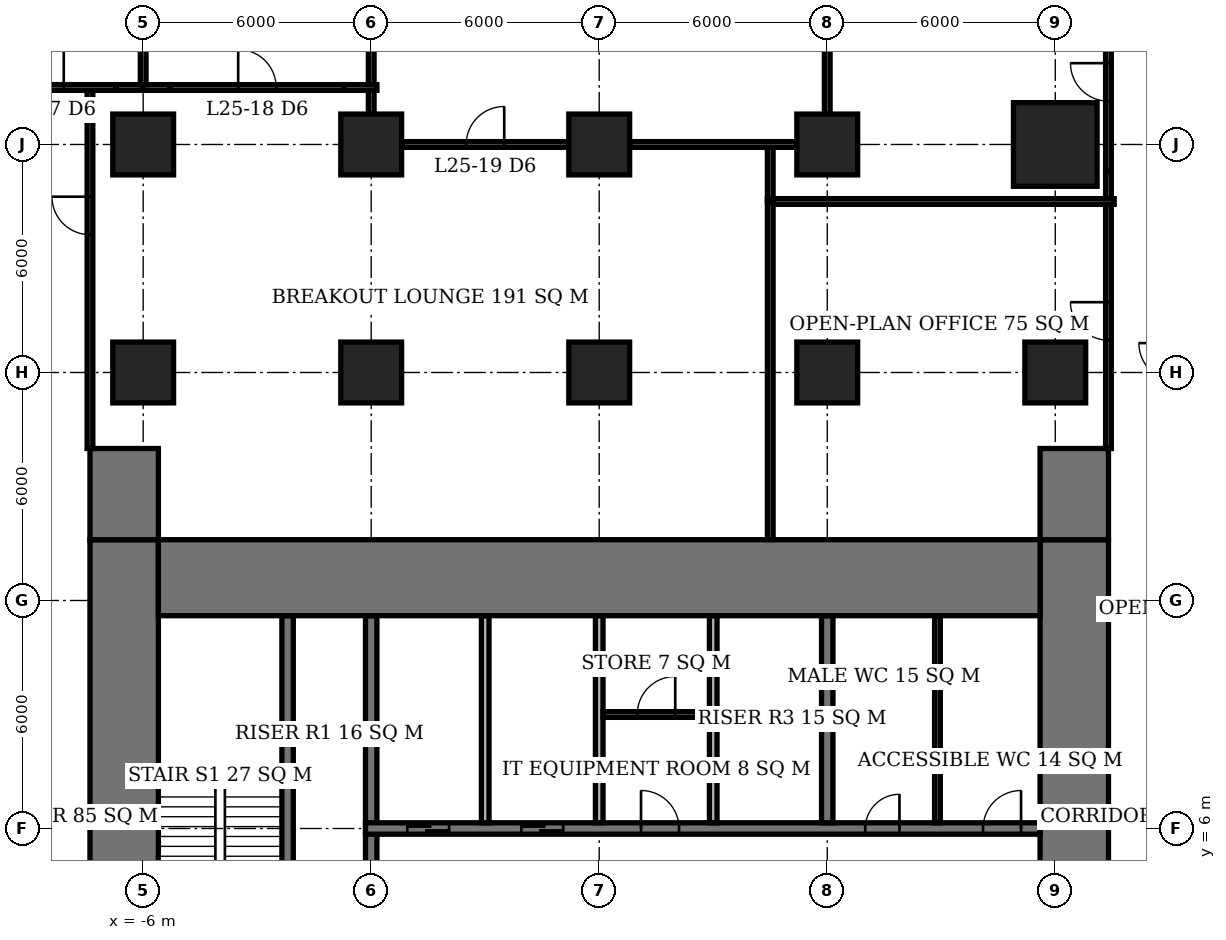
"""IFC4 building model, lengths in metres.
Left out: names, types, materials, properties, quantities, classifications, styles, units other than length and angle.
Written with IfcOpenShell. Run it as: python <this file> out.ifc"""

import sys

from ifc_helpers import new_model, si_unit, direction, frame, frame_2d, origin, origin_2d, place, context, subcontext, project, spatial, rectangle, extrude, element, fill, save


model = new_model("IFC4")
c1 = context("Model", 3, precision=1e-05, world=origin(), true_north=direction((0.0, 1.0)))
c2 = subcontext(c1, "Body", "Model", "MODEL_VIEW")
j1 = project(units=[si_unit("LENGTHUNIT", "METRE"), si_unit("PLANEANGLEUNIT", "RADIAN")], contexts=[c1])
p1 = place(None, origin())
s1 = spatial("IfcSite", under=j1, at=p1, CompositionType="ELEMENT")
p2 = place(p1, origin())
s2 = spatial("IfcBuilding", under=s1, at=p2, CompositionType="ELEMENT")
p3 = place(p2, frame((0.0, 0.0, 105.5)))
s3 = spatial("IfcBuildingStorey", under=s2, at=p3, CompositionType="ELEMENT", Elevation=105.5)
for number, where, z_axis, x_axis in (
    (1, (-6.0, 18.0, 0.0), (0.0, 0.0, 1.0), (1.0, 0.0, 0.0)),
    (2, (-6.0, 24.0, 0.0), (0.0, 0.0, 1.0), (1.0, 0.0, 0.0)),
    (3, (0.0, 18.0, 0.0), (0.0, 0.0, 1.0), (1.0, 0.0, 0.0)),
    (4, (0.0, 24.0, 0.0), (0.0, 0.0, 1.0), (1.0, 0.0, 0.0)),
    (5, (6.0, 18.0, 0.0), (0.0, 0.0, 1.0), (1.0, 0.0, 0.0)),
    (6, (6.0, 24.0, 0.0), (0.0, 0.0, 1.0), (1.0, 0.0, 0.0)),
    (7, (12.0, 18.0, 0.0), (0.0, 0.0, 1.0), (1.0, 0.0, 0.0)),
    (8, (12.0, 24.0, 0.0), (0.0, 0.0, 1.0), (1.0, 0.0, 0.0)),
    (9, (18.0, 18.0, 0.0), (0.0, 0.0, 1.0), (1.0, 0.0, 0.0)),
):
    element("IfcColumn", number, at=place(p3, frame(where, z_axis=z_axis, x_axis=x_axis)), inside=s3, PredefinedType="COLUMN", context=c2, shape_type="SweptSolid", body=[
        extrude(rectangle(XDim=1.6, YDim=1.6, at=origin_2d()), origin(), (0.0, 0.0, 1.0), 3.9),
    ])
p4 = place(p3, frame((18.0, 24.0, 0.0), z_axis=(0.0, 0.0, 1.0), x_axis=(1.0, 0.0, 0.0)))
e10 = element("IfcColumn", 10, at=p4, inside=s3, PredefinedType="COLUMN", context=c2, shape_type="SweptSolid", body=[
    extrude(rectangle(XDim=2.2, YDim=2.2, at=origin_2d()), origin(), (0.0, 0.0, 1.0), 3.9),
])
p5 = place(p3, frame((-5.6, 12.6, 0.0), z_axis=(0.0, 0.0, 1.0), x_axis=(1.0, 0.0, 0.0)))
e11 = element("IfcWall", 11, at=p5, inside=s3, PredefinedType="SHEAR", context=c2, shape_type="SweptSolid", body=[
    extrude(rectangle(XDim=23.2, YDim=2.0, at=frame_2d((11.6, 0.0))), origin(), (0.0, 0.0, 1.0), 3.9),
])
p6 = place(p3, frame((-6.5, -7.6, 0.0), z_axis=(0.0, 0.0, 1.0), x_axis=(0.0, 1.0, 0.0)))
e12 = element("IfcWall", 12, at=p6, inside=s3, PredefinedType="SHEAR", context=c2, shape_type="SweptSolid", body=[
    extrude(rectangle(XDim=21.2, YDim=1.8, at=frame_2d((10.6, 0.0))), origin(), (0.0, 0.0, 1.0), 3.9),
])
p7 = place(p6, frame((7.8, 0.0, 0.0)))
e13 = element("IfcOpeningElement", 13, at=p7, cuts=e12, PredefinedType="OPENING", context=c2, shape_type="SweptSolid", body=[
    extrude(rectangle(XDim=1.8, YDim=2.4, at=frame_2d((0.9, 1.2))), frame((0.0, 0.91, 0.0), z_axis=(0.0, -1.0, 0.0), x_axis=(1.0, 0.0, 0.0)), (0.0, 0.0, 1.0), 1.82),
])
p8 = place(p3, frame((18.5, -7.6, 0.0), z_axis=(0.0, 0.0, 1.0), x_axis=(0.0, 1.0, 0.0)))
e14 = element("IfcWall", 14, at=p8, inside=s3, PredefinedType="SHEAR", context=c2, shape_type="SweptSolid", body=[
    extrude(rectangle(XDim=21.2, YDim=1.8, at=frame_2d((10.6, 0.0))), origin(), (0.0, 0.0, 1.0), 3.9),
])
p9 = place(p8, frame((9.2, 0.0, 0.0)))
e15 = element("IfcOpeningElement", 15, at=p9, cuts=e14, PredefinedType="OPENING", context=c2, shape_type="SweptSolid", body=[
    extrude(rectangle(XDim=1.8, YDim=2.4, at=frame_2d((0.9, 1.2))), frame((0.0, 0.91, 0.0), z_axis=(0.0, -1.0, 0.0), x_axis=(1.0, 0.0, 0.0)), (0.0, 0.0, 1.0), 1.82),
])
for number, where, z_axis, x_axis in (
    (16, (-6.5, 13.6, 0.0), (0.0, 0.0, 1.0), (0.0, 1.0, 0.0)),
    (17, (18.5, 13.6, 0.0), (0.0, 0.0, 1.0), (0.0, 1.0, 0.0)),
):
    element("IfcWall", number, at=place(p3, frame(where, z_axis=z_axis, x_axis=x_axis)), inside=s3, PredefinedType="SHEAR", context=c2, shape_type="SweptSolid", body=[
        extrude(rectangle(XDim=2.4, YDim=1.8, at=frame_2d((1.2, 0.0))), origin(), (0.0, 0.0, 1.0), 3.9),
    ])
p10 = place(p3, frame((-0.15, 6.0, 0.0), z_axis=(0.0, 0.0, 1.0), x_axis=(1.0, 0.0, 0.0)))
e18 = element("IfcWall", 18, at=p10, inside=s3, PredefinedType="SHEAR", context=c2, shape_type="SweptSolid", body=[
    extrude(rectangle(XDim=17.75, YDim=0.3, at=frame_2d((8.875, 0.0))), origin(), (0.0, 0.0, 1.0), 3.9),
])
p11 = place(p10, frame((13.15, 0.0, 0.0)))
e19 = element("IfcOpeningElement", 19, at=p11, cuts=e18, PredefinedType="OPENING", context=c2, shape_type="SweptSolid", body=[
    extrude(rectangle(XDim=0.9, YDim=2.1, at=frame_2d((0.45, 1.05))), frame((0.0, 0.16, 0.0), z_axis=(0.0, -1.0, 0.0), x_axis=(1.0, 0.0, 0.0)), (0.0, 0.0, 1.0), 0.32),
])
p12 = place(p10, frame((16.25, 0.0, 0.0)))
e20 = element("IfcOpeningElement", 20, at=p12, cuts=e18, PredefinedType="OPENING", context=c2, shape_type="SweptSolid", body=[
    extrude(rectangle(XDim=1.0, YDim=2.1, at=frame_2d((0.5, 1.05))), frame((0.0, 0.16, 0.0), z_axis=(0.0, -1.0, 0.0), x_axis=(1.0, 0.0, 0.0)), (0.0, 0.0, 1.0), 0.32),
])
p13 = place(p10, frame((7.25, 0.0, 0.0)))
e21 = element("IfcOpeningElement", 21, at=p13, cuts=e18, PredefinedType="OPENING", context=c2, shape_type="SweptSolid", body=[
    extrude(rectangle(XDim=1.0, YDim=2.1, at=frame_2d((0.5, 1.05))), frame((0.0, 0.16, 0.0), z_axis=(0.0, -1.0, 0.0), x_axis=(1.0, 0.0, 0.0)), (0.0, 0.0, 1.0), 0.32),
])
p14 = place(p10, frame((1.1, 0.0, 0.0)))
e22 = element("IfcOpeningElement", 22, at=p14, cuts=e18, PredefinedType="OPENING", context=c2, shape_type="SweptSolid", body=[
    extrude(rectangle(XDim=1.1, YDim=2.1, at=frame_2d((0.55, 1.05))), frame((0.0, 0.16, 0.0), z_axis=(0.0, -1.0, 0.0), x_axis=(1.0, 0.0, 0.0)), (0.0, 0.0, 1.0), 0.32),
])
p15 = place(p10, frame((4.1, 0.0, 0.0)))
e23 = element("IfcOpeningElement", 23, at=p15, cuts=e18, PredefinedType="OPENING", context=c2, shape_type="SweptSolid", body=[
    extrude(rectangle(XDim=1.1, YDim=2.1, at=frame_2d((0.55, 1.05))), frame((0.0, 0.16, 0.0), z_axis=(0.0, -1.0, 0.0), x_axis=(1.0, 0.0, 0.0)), (0.0, 0.0, 1.0), 0.32),
])
p16 = place(p3, frame((0.0, 3.15, 0.0), z_axis=(0.0, 0.0, 1.0), x_axis=(0.0, 1.0, 0.0)))
e24 = element("IfcWall", 24, at=p16, inside=s3, PredefinedType="SHEAR", context=c2, shape_type="SweptSolid", body=[
    extrude(rectangle(XDim=8.45, YDim=0.3, at=frame_2d((4.225, 0.0))), origin(), (0.0, 0.0, 1.0), 3.9),
])
p17 = place(p3, frame((12.0, 6.15, 0.0), z_axis=(0.0, 0.0, 1.0), x_axis=(0.0, 1.0, 0.0)))
e25 = element("IfcWall", 25, at=p17, inside=s3, PredefinedType="SHEAR", context=c2, shape_type="SweptSolid", body=[
    extrude(rectangle(XDim=5.45, YDim=0.3, at=frame_2d((2.725, 0.0))), origin(), (0.0, 0.0, 1.0), 3.9),
])
p18 = place(p3, frame((-2.2, 3.15, 0.0), z_axis=(0.0, 0.0, 1.0), x_axis=(0.0, 1.0, 0.0)))
e26 = element("IfcWall", 26, at=p18, inside=s3, PredefinedType="SHEAR", context=c2, shape_type="SweptSolid", body=[
    extrude(rectangle(XDim=8.45, YDim=0.3, at=frame_2d((4.225, 0.0))), origin(), (0.0, 0.0, 1.0), 3.9),
])
for number, where, z_axis, x_axis in (
    (27, (3.0, 6.15, 0.0), (0.0, 0.0, 1.0), (0.0, 1.0, 0.0)),
    (28, (6.0, 6.15, 0.0), (0.0, 0.0, 1.0), (0.0, 1.0, 0.0)),
    (29, (9.0, 6.15, 0.0), (0.0, 0.0, 1.0), (0.0, 1.0, 0.0)),
):
    element("IfcWall", number, at=place(p3, frame(where, z_axis=z_axis, x_axis=x_axis)), inside=s3, PredefinedType="SOLIDWALL", context=c2, shape_type="SweptSolid", body=[
        extrude(rectangle(XDim=5.45, YDim=0.2, at=frame_2d((2.725, 0.0))), origin(), (0.0, 0.0, 1.0), 3.9),
    ])
p19 = place(p3, frame((14.9, 6.15, 0.0), z_axis=(0.0, 0.0, 1.0), x_axis=(0.0, 1.0, 0.0)))
e30 = element("IfcWall", 30, at=p19, inside=s3, PredefinedType="PLUMBINGWALL", context=c2, shape_type="SweptSolid", body=[
    extrude(rectangle(XDim=5.45, YDim=0.15, at=frame_2d((2.725, 0.0))), origin(), (0.0, 0.0, 1.0), 3.65),
])
p20 = place(p3, frame((6.1, 9.0, 0.0), z_axis=(0.0, 0.0, 1.0), x_axis=(1.0, 0.0, 0.0)))
e31 = element("IfcWall", 31, at=p20, inside=s3, PredefinedType="PARTITIONING", context=c2, shape_type="SweptSolid", body=[
    extrude(rectangle(XDim=2.8, YDim=0.15, at=frame_2d((1.4, 0.0))), origin(), (0.0, 0.0, 1.0), 3.65),
])
p21 = place(p20, frame((0.9, 0.0, 0.0)))
e32 = element("IfcOpeningElement", 32, at=p21, cuts=e31, PredefinedType="OPENING", context=c2, shape_type="SweptSolid", body=[
    extrude(rectangle(XDim=1.0, YDim=2.1, at=frame_2d((0.5, 1.05))), frame((0.0, 0.085, 0.0), z_axis=(0.0, -1.0, 0.0), x_axis=(1.0, 0.0, 0.0)), (0.0, 0.0, 1.0), 0.17),
])
p22 = place(p3, frame((0.8, 24.0, 0.0), z_axis=(0.0, 0.0, 1.0), x_axis=(1.0, 0.0, 0.0)))
e33 = element("IfcWall", 33, at=p22, inside=s3, PredefinedType="PARTITIONING", context=c2, shape_type="SweptSolid", body=[
    extrude(rectangle(XDim=4.4, YDim=0.15, at=frame_2d((2.2, 0.0))), origin(), (0.0, 0.0, 1.0), 3.65),
])
p23 = place(p22, frame((1.7, 0.0, 0.0)))
e34 = element("IfcOpeningElement", 34, at=p23, cuts=e33, PredefinedType="OPENING", context=c2, shape_type="SweptSolid", body=[
    extrude(rectangle(XDim=1.0, YDim=2.1, at=frame_2d((0.5, 1.05))), frame((0.0, 0.085, 0.0), z_axis=(0.0, -1.0, 0.0), x_axis=(1.0, 0.0, 0.0)), (0.0, 0.0, 1.0), 0.17),
])
p24 = place(p3, frame((6.8, 24.0, 0.0), z_axis=(0.0, 0.0, 1.0), x_axis=(1.0, 0.0, 0.0)))
e35 = element("IfcWall", 35, at=p24, inside=s3, PredefinedType="PARTITIONING", context=c2, shape_type="SweptSolid", body=[
    extrude(rectangle(XDim=4.4, YDim=0.15, at=frame_2d((2.2, 0.0))), origin(), (0.0, 0.0, 1.0), 3.65),
])
p25 = place(p3, frame((-11.49, 25.5, 0.0), z_axis=(0.0, 0.0, 1.0), x_axis=(1.0, 0.0, 0.0)))
e36 = element("IfcWall", 36, at=p25, inside=s3, PredefinedType="PARTITIONING", context=c2, shape_type="SweptSolid", body=[
    extrude(rectangle(XDim=4.78, YDim=0.15, at=frame_2d((2.39, 0.0))), origin(), (0.0, 0.0, 1.0), 3.65),
])
p26 = place(p25, frame((2.4, 0.0, 0.0)))
e37 = element("IfcOpeningElement", 37, at=p26, cuts=e36, PredefinedType="OPENING", context=c2, shape_type="SweptSolid", body=[
    extrude(rectangle(XDim=1.0, YDim=2.1, at=frame_2d((0.5, 1.05))), frame((0.0, 0.085, 0.0), z_axis=(0.0, -1.0, 0.0), x_axis=(1.0, 0.0, 0.0)), (0.0, 0.0, 1.0), 0.17),
])
p27 = place(p3, frame((-6.71, 25.5, 0.0), z_axis=(0.0, 0.0, 1.0), x_axis=(1.0, 0.0, 0.0)))
e38 = element("IfcWall", 38, at=p27, inside=s3, PredefinedType="PARTITIONING", context=c2, shape_type="SweptSolid", body=[
    extrude(rectangle(XDim=0.785, YDim=0.15, at=frame_2d((0.393, 0.0))), origin(), (0.0, 0.0, 1.0), 2.65),
])
p28 = place(p3, frame((-6.0, 25.5, 0.0), z_axis=(0.0, 0.0, 1.0), x_axis=(1.0, 0.0, 0.0)))
e39 = element("IfcWall", 39, at=p28, inside=s3, PredefinedType="PARTITIONING", context=c2, shape_type="SweptSolid", body=[
    extrude(rectangle(XDim=0.71, YDim=0.15, at=frame_2d((0.355, 0.0))), origin(), (0.0, 0.0, 1.0), 2.65),
])
p29 = place(p3, frame((-5.29, 25.5, 0.0), z_axis=(0.0, 0.0, 1.0), x_axis=(1.0, 0.0, 0.0)))
e40 = element("IfcWall", 40, at=p29, inside=s3, PredefinedType="PARTITIONING", context=c2, shape_type="SweptSolid", body=[
    extrude(rectangle(XDim=4.58, YDim=0.15, at=frame_2d((2.29, 0.0))), origin(), (0.0, 0.0, 1.0), 3.65),
])
p30 = place(p29, frame((1.79, 0.0, 0.0)))
e41 = element("IfcOpeningElement", 41, at=p30, cuts=e40, PredefinedType="OPENING", context=c2, shape_type="SweptSolid", body=[
    extrude(rectangle(XDim=1.0, YDim=2.1, at=frame_2d((0.5, 1.05))), frame((0.0, 0.085, 0.0), z_axis=(0.0, -1.0, 0.0), x_axis=(1.0, 0.0, 0.0)), (0.0, 0.0, 1.0), 0.17),
])
p31 = place(p3, frame((-0.71, 25.5, 0.0), z_axis=(0.0, 0.0, 1.0), x_axis=(1.0, 0.0, 0.0)))
e42 = element("IfcWall", 42, at=p31, inside=s3, PredefinedType="PARTITIONING", context=c2, shape_type="SweptSolid", body=[
    extrude(rectangle(XDim=0.86, YDim=0.15, at=frame_2d((0.43, 0.0))), origin(), (0.0, 0.0, 1.0), 2.65),
])
p32 = place(p3, frame((-6.0, 25.575, 0.0), z_axis=(0.0, 0.0, 1.0), x_axis=(0.0, 1.0, 0.0)))
e43 = element("IfcWall", 43, at=p32, inside=s3, PredefinedType="PARTITIONING", context=c2, shape_type="SweptSolid", body=[
    extrude(rectangle(XDim=2.735, YDim=0.15, at=frame_2d((1.368, 0.0))), origin(), (0.0, 0.0, 1.0), 2.65),
])
p33 = place(p3, frame((0.0, 24.8, 0.0), z_axis=(0.0, 0.0, 1.0), x_axis=(0.0, 1.0, 0.0)))
e44 = element("IfcWall", 44, at=p33, inside=s3, PredefinedType="PARTITIONING", context=c2, shape_type="SweptSolid", body=[
    extrude(rectangle(XDim=0.625, YDim=0.15, at=frame_2d((0.312, 0.0))), origin(), (0.0, 0.0, 1.0), 2.65),
])
p34 = place(p3, frame((0.0, 25.575, 0.0), z_axis=(0.0, 0.0, 1.0), x_axis=(0.0, 1.0, 0.0)))
e45 = element("IfcWall", 45, at=p34, inside=s3, PredefinedType="PARTITIONING", context=c2, shape_type="SweptSolid", body=[
    extrude(rectangle(XDim=2.735, YDim=0.15, at=frame_2d((1.368, 0.0))), origin(), (0.0, 0.0, 1.0), 2.65),
])
p35 = place(p3, frame((12.0, 24.8, 0.0), z_axis=(0.0, 0.0, 1.0), x_axis=(0.0, 1.0, 0.0)))
e46 = element("IfcWall", 46, at=p35, inside=s3, PredefinedType="PARTITIONING", context=c2, shape_type="SweptSolid", body=[
    extrude(rectangle(XDim=3.51, YDim=0.15, at=frame_2d((1.755, 0.0))), origin(), (0.0, 0.0, 1.0), 2.65),
])
p36 = place(p3, frame((-7.4, 16.0, 0.0), z_axis=(0.0, 0.0, 1.0), x_axis=(0.0, 1.0, 0.0)))
e47 = element("IfcWall", 47, at=p36, inside=s3, PredefinedType="PARTITIONING", context=c2, shape_type="SweptSolid", body=[
    extrude(rectangle(XDim=9.425, YDim=0.15, at=frame_2d((4.712, 0.0))), origin(), (0.0, 0.0, 1.0), 3.65),
])
p37 = place(p36, frame((5.626, 0.0, 0.0)))
e48 = element("IfcOpeningElement", 48, at=p37, cuts=e47, PredefinedType="OPENING", context=c2, shape_type="SweptSolid", body=[
    extrude(rectangle(XDim=1.0, YDim=2.1, at=frame_2d((0.5, 1.05))), frame((0.0, 0.085, 0.0), z_axis=(0.0, -1.0, 0.0), x_axis=(1.0, 0.0, 0.0)), (0.0, 0.0, 1.0), 0.17),
])
p38 = place(p3, frame((10.5, 13.6, 0.0), z_axis=(0.0, 0.0, 1.0), x_axis=(0.0, 1.0, 0.0)))
e49 = element("IfcWall", 49, at=p38, inside=s3, PredefinedType="PARTITIONING", context=c2, shape_type="SweptSolid", body=[
    extrude(rectangle(XDim=8.975, YDim=0.15, at=frame_2d((4.487, 0.0))), origin(), (0.0, 0.0, 1.0), 3.65),
])
p39 = place(p3, frame((10.5, 22.5, 0.0), z_axis=(0.0, 0.0, 1.0), x_axis=(0.0, 1.0, 0.0)))
e50 = element("IfcWall", 50, at=p39, inside=s3, PredefinedType="PARTITIONING", context=c2, shape_type="SweptSolid", body=[
    extrude(rectangle(XDim=1.425, YDim=0.15, at=frame_2d((0.712, 0.0))), origin(), (0.0, 0.0, 1.0), 3.65),
])
p40 = place(p3, frame((10.575, 22.5, 0.0), z_axis=(0.0, 0.0, 1.0), x_axis=(1.0, 0.0, 0.0)))
e51 = element("IfcWall", 51, at=p40, inside=s3, PredefinedType="PARTITIONING", context=c2, shape_type="SweptSolid", body=[
    extrude(rectangle(XDim=8.975, YDim=0.15, at=frame_2d((4.488, 0.0))), origin(), (0.0, 0.0, 1.0), 3.65),
])
p41 = place(p3, frame((19.4, 16.0, 0.0), z_axis=(0.0, 0.0, 1.0), x_axis=(0.0, 1.0, 0.0)))
e52 = element("IfcWall", 52, at=p41, inside=s3, PredefinedType="PARTITIONING", context=c2, shape_type="SweptSolid", body=[
    extrude(rectangle(XDim=6.425, YDim=0.15, at=frame_2d((3.212, 0.0))), origin(), (0.0, 0.0, 1.0), 3.65),
])
p42 = place(p41, frame((2.85, 0.0, 0.0)))
e53 = element("IfcOpeningElement", 53, at=p42, cuts=e52, PredefinedType="OPENING", context=c2, shape_type="SweptSolid", body=[
    extrude(rectangle(XDim=1.0, YDim=2.1, at=frame_2d((0.5, 1.05))), frame((0.0, 0.085, 0.0), z_axis=(0.0, -1.0, 0.0), x_axis=(1.0, 0.0, 0.0)), (0.0, 0.0, 1.0), 0.17),
])
p43 = place(p3, frame((19.4, 22.575, 0.0), z_axis=(0.0, 0.0, 1.0), x_axis=(0.0, 1.0, 0.0)))
e54 = element("IfcWall", 54, at=p43, inside=s3, PredefinedType="PARTITIONING", context=c2, shape_type="SweptSolid", body=[
    extrude(rectangle(XDim=0.715, YDim=0.15, at=frame_2d((0.357, 0.0))), origin(), (0.0, 0.0, 1.0), 3.65),
])
p44 = place(p3, frame((19.4, 23.29, 0.0), z_axis=(0.0, 0.0, 1.0), x_axis=(0.0, 1.0, 0.0)))
e55 = element("IfcWall", 55, at=p44, inside=s3, PredefinedType="PARTITIONING", context=c2, shape_type="SweptSolid", body=[
    extrude(rectangle(XDim=3.85, YDim=0.15, at=frame_2d((1.925, 0.0))), origin(), (0.0, 0.0, 1.0), 2.65),
])
p45 = place(p44, frame((1.85, 0.0, 0.0)))
e56 = element("IfcOpeningElement", 56, at=p45, cuts=e55, PredefinedType="OPENING", context=c2, shape_type="SweptSolid", body=[
    extrude(rectangle(XDim=1.0, YDim=2.1, at=frame_2d((0.5, 1.05))), frame((0.0, 0.085, 0.0), z_axis=(0.0, -1.0, 0.0), x_axis=(1.0, 0.0, 0.0)), (0.0, 0.0, 1.0), 0.17),
])
p46 = place(p11, origin())
e57 = element("IfcDoor", 57, at=p46, inside=s3, OperationType="SINGLE_SWING_RIGHT", PredefinedType="DOOR", context=c2, shape_type="SweptSolid", body=[
    extrude(rectangle(XDim=0.9, YDim=2.1, at=frame_2d((0.45, 1.05))), frame((0.0, 0.025, 0.0), z_axis=(0.0, -1.0, 0.0), x_axis=(1.0, 0.0, 0.0)), (0.0, 0.0, 1.0), 0.05),
])
fill(e19, e57)
p47 = place(p12, origin())
e58 = element("IfcDoor", 58, at=p47, inside=s3, OperationType="SINGLE_SWING_RIGHT", PredefinedType="DOOR", context=c2, shape_type="SweptSolid", body=[
    extrude(rectangle(XDim=1.0, YDim=2.1, at=frame_2d((0.5, 1.05))), frame((0.0, 0.025, 0.0), z_axis=(0.0, -1.0, 0.0), x_axis=(1.0, 0.0, 0.0)), (0.0, 0.0, 1.0), 0.05),
])
fill(e20, e58)
p48 = place(p21, origin())
e59 = element("IfcDoor", 59, at=p48, inside=s3, OperationType="SINGLE_SWING_RIGHT", PredefinedType="DOOR", context=c2, shape_type="SweptSolid", body=[
    extrude(rectangle(XDim=1.0, YDim=2.1, at=frame_2d((0.5, 1.05))), frame((0.0, 0.025, 0.0), z_axis=(0.0, -1.0, 0.0), x_axis=(1.0, 0.0, 0.0)), (0.0, 0.0, 1.0), 0.05),
])
fill(e32, e59)
p49 = place(p13, origin())
e60 = element("IfcDoor", 60, at=p49, inside=s3, OperationType="SINGLE_SWING_LEFT", PredefinedType="DOOR", context=c2, shape_type="SweptSolid", body=[
    extrude(rectangle(XDim=1.0, YDim=2.1, at=frame_2d((0.5, 1.05))), frame((0.0, 0.025, 0.0), z_axis=(0.0, -1.0, 0.0), x_axis=(1.0, 0.0, 0.0)), (0.0, 0.0, 1.0), 0.05),
])
fill(e21, e60)
p50 = place(p14, origin())
e61 = element("IfcDoor", 61, at=p50, inside=s3, OperationType="DOUBLE_DOOR_SLIDING", PredefinedType="USERDEFINED", context=c2, shape_type="SweptSolid", body=[
    extrude(rectangle(XDim=1.1, YDim=2.1, at=frame_2d((0.55, 1.05))), frame((0.0, 0.025, 0.0), z_axis=(0.0, -1.0, 0.0), x_axis=(1.0, 0.0, 0.0)), (0.0, 0.0, 1.0), 0.05),
])
fill(e22, e61)
p51 = place(p15, origin())
e62 = element("IfcDoor", 62, at=p51, inside=s3, OperationType="DOUBLE_DOOR_SLIDING", PredefinedType="USERDEFINED", context=c2, shape_type="SweptSolid", body=[
    extrude(rectangle(XDim=1.1, YDim=2.1, at=frame_2d((0.55, 1.05))), frame((0.0, 0.025, 0.0), z_axis=(0.0, -1.0, 0.0), x_axis=(1.0, 0.0, 0.0)), (0.0, 0.0, 1.0), 0.05),
])
fill(e23, e62)
p52 = place(p26, origin())
e63 = element("IfcDoor", 63, at=p52, inside=s3, OperationType="SINGLE_SWING_RIGHT", PredefinedType="DOOR", context=c2, shape_type="SweptSolid", body=[
    extrude(rectangle(XDim=1.0, YDim=2.1, at=frame_2d((0.5, 1.05))), frame((0.0, 0.025, 0.0), z_axis=(0.0, -1.0, 0.0), x_axis=(1.0, 0.0, 0.0)), (0.0, 0.0, 1.0), 0.05),
])
fill(e37, e63)
p53 = place(p30, origin())
e64 = element("IfcDoor", 64, at=p53, inside=s3, OperationType="SINGLE_SWING_LEFT", PredefinedType="DOOR", context=c2, shape_type="SweptSolid", body=[
    extrude(rectangle(XDim=1.0, YDim=2.1, at=frame_2d((0.5, 1.05))), frame((0.0, 0.025, 0.0), z_axis=(0.0, -1.0, 0.0), x_axis=(1.0, 0.0, 0.0)), (0.0, 0.0, 1.0), 0.05),
])
fill(e41, e64)
p54 = place(p23, origin())
e65 = element("IfcDoor", 65, at=p54, inside=s3, OperationType="SINGLE_SWING_RIGHT", PredefinedType="DOOR", context=c2, shape_type="SweptSolid", body=[
    extrude(rectangle(XDim=1.0, YDim=2.1, at=frame_2d((0.5, 1.05))), frame((0.0, 0.025, 0.0), z_axis=(0.0, -1.0, 0.0), x_axis=(1.0, 0.0, 0.0)), (0.0, 0.0, 1.0), 0.05),
])
fill(e34, e65)
p55 = place(p37, origin())
e66 = element("IfcDoor", 66, at=p55, inside=s3, OperationType="SINGLE_SWING_RIGHT", PredefinedType="DOOR", context=c2, shape_type="SweptSolid", body=[
    extrude(rectangle(XDim=1.0, YDim=2.1, at=frame_2d((0.5, 1.05))), frame((0.0, 0.025, 0.0), z_axis=(0.0, -1.0, 0.0), x_axis=(1.0, 0.0, 0.0)), (0.0, 0.0, 1.0), 0.05),
])
fill(e48, e66)
p56 = place(p42, origin())
e67 = element("IfcDoor", 67, at=p56, inside=s3, OperationType="SINGLE_SWING_RIGHT", PredefinedType="DOOR", context=c2, shape_type="SweptSolid", body=[
    extrude(rectangle(XDim=1.0, YDim=2.1, at=frame_2d((0.5, 1.05))), frame((0.0, 0.025, 0.0), z_axis=(0.0, -1.0, 0.0), x_axis=(1.0, 0.0, 0.0)), (0.0, 0.0, 1.0), 0.05),
])
fill(e53, e67)
p57 = place(p45, origin())
e68 = element("IfcDoor", 68, at=p57, inside=s3, OperationType="SINGLE_SWING_RIGHT", PredefinedType="DOOR", context=c2, shape_type="SweptSolid", body=[
    extrude(rectangle(XDim=1.0, YDim=2.1, at=frame_2d((0.5, 1.05))), frame((0.0, 0.025, 0.0), z_axis=(0.0, -1.0, 0.0), x_axis=(1.0, 0.0, 0.0)), (0.0, 0.0, 1.0), 0.05),
])
fill(e56, e68)
save(model, sys.argv[1])
